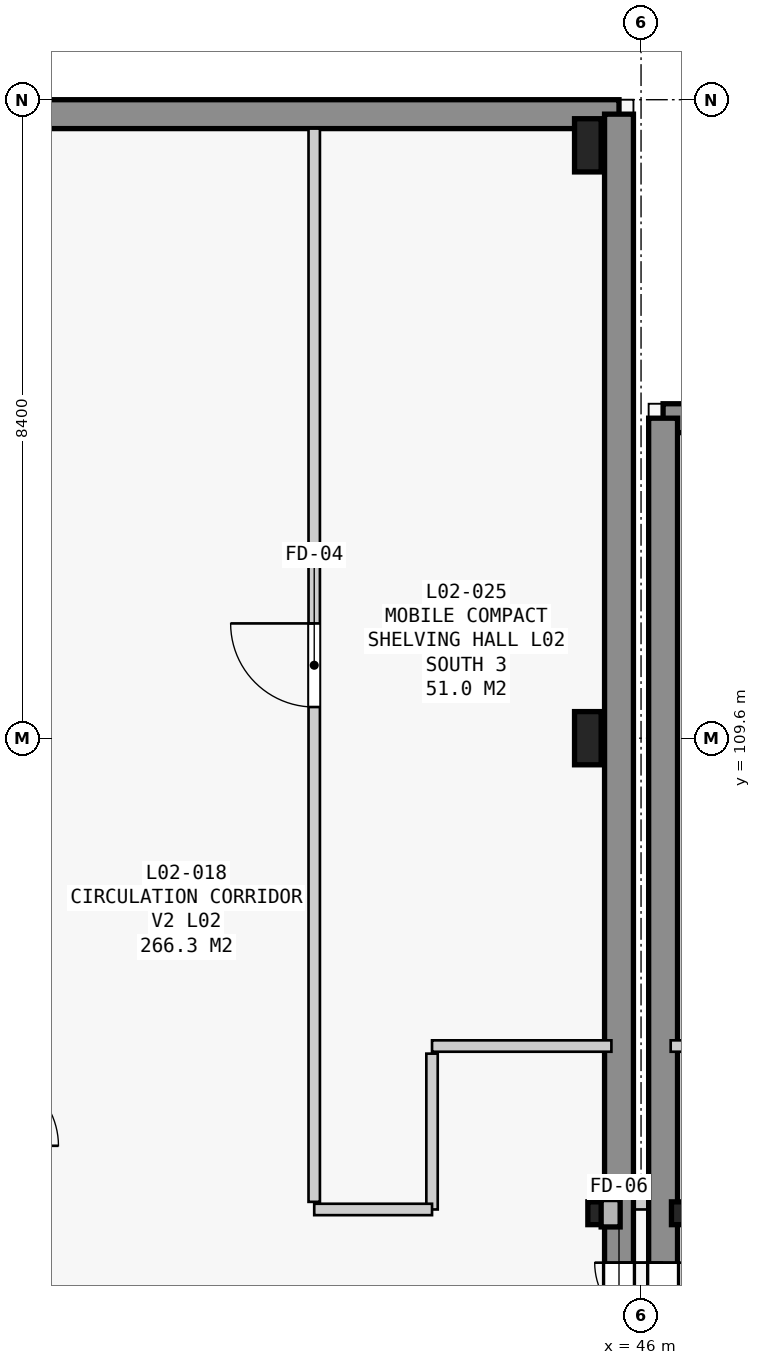
"""IFC4 building model, lengths in metres.
Left out: names, types, materials, properties, quantities, classifications, styles, units other than length and angle.
Written with IfcOpenShell. Run it as: python <this file> out.ifc"""

import sys

from ifc_helpers import new_model, si_unit, direction, frame, frame_2d, origin, origin_2d, place, context, subcontext, project, spatial, rectangle, i_section, extrude, element, fill, save


model = new_model("IFC4")
c1 = context("Model", 3, precision=1e-05, world=origin(), true_north=direction((0.0, 1.0)))
c2 = subcontext(c1, "Body", "Model", "MODEL_VIEW")
j1 = project(units=[si_unit("LENGTHUNIT", "METRE"), si_unit("PLANEANGLEUNIT", "RADIAN")], contexts=[c1])
p1 = place(None, origin())
s1 = spatial("IfcSite", under=j1, at=p1, CompositionType="ELEMENT")
p2 = place(p1, origin())
s2 = spatial("IfcBuilding", under=s1, at=p2, CompositionType="ELEMENT")
p3 = place(p2, frame((0.0, 0.0, 9.6)))
s3 = spatial("IfcBuildingStorey", under=s2, at=p3, CompositionType="ELEMENT", Elevation=9.6)
for number, where, z_axis, x_axis in (
    (1, (45.3, 109.6, 0.0), (0.0, 0.0, 1.0), (1.0, 0.0, 0.0)),
    (2, (45.3, 117.4, 0.0), (0.0, 0.0, 1.0), (1.0, 0.0, 0.0)),
):
    element("IfcColumn", number, at=place(p3, frame(where, z_axis=z_axis, x_axis=x_axis)), inside=s3, PredefinedType="COLUMN", context=c2, shape_type="SweptSolid", body=[
        extrude(rectangle(XDim=0.35, YDim=0.7, at=origin_2d()), origin(), (0.0, 0.0, 1.0), 4.2),
    ])
for number, where, z_axis, x_axis in (
    (3, (45.45, 103.35, 0.0), (0.0, 0.0, 1.0), (1.0, 0.0, 0.0)),
    (4, (46.55, 103.35, 0.0), (0.0, 0.0, 1.0), (1.0, 0.0, 0.0)),
):
    element("IfcColumn", number, at=place(p3, frame(where, z_axis=z_axis, x_axis=x_axis)), inside=s3, PredefinedType="COLUMN", context=c2, shape_type="SweptSolid", body=[
        extrude(i_section(OverallWidth=0.3, OverallDepth=0.3, WebThickness=0.011, FlangeThickness=0.019, FilletRadius=0.027, at=origin_2d()), origin(), (0.0, 0.0, 1.0), 4.2),
    ])
p4 = place(p3, frame((45.9, 103.5, 0.0), z_axis=(0.0, 0.0, 1.0), x_axis=(1.0, 0.0, 0.0)))
e5 = element("IfcWall", 5, at=p4, inside=s3, PredefinedType="STANDARD", context=c2, shape_type="SweptSolid", body=[
    extrude(rectangle(XDim=0.2, YDim=0.2, at=frame_2d((0.1, 0.0))), origin(), (0.0, 0.0, 1.0), 3.94),
])
p5 = place(p3, frame((12.59, 117.81, 0.0), z_axis=(0.0, 0.0, 1.0), x_axis=(1.0, 0.0, 0.0)))
e6 = element("IfcWall", 6, at=p5, inside=s3, PredefinedType="STANDARD", context=c2, shape_type="SweptSolid", body=[
    extrude(rectangle(XDim=33.12, YDim=0.38, at=frame_2d((16.56, 0.0))), origin(), (0.0, 0.0, 1.0), 3.88),
])
p6 = place(p3, frame((45.71, 117.81, 0.0), z_axis=(0.0, 0.0, 1.0), x_axis=(0.0, -1.0, 0.0)))
e7 = element("IfcWall", 7, at=p6, inside=s3, PredefinedType="STANDARD", context=c2, shape_type="SweptSolid", body=[
    extrude(rectangle(XDim=27.22, YDim=0.38, at=frame_2d((13.61, 0.0))), origin(), (0.0, 0.0, 1.0), 3.88),
])
p7 = place(p6, frame((15.11, 0.0, 0.0)))
e8 = element("IfcOpeningElement", 8, at=p7, cuts=e7, PredefinedType="OPENING", context=c2, shape_type="SweptSolid", body=[
    extrude(rectangle(XDim=1.8, YDim=2.2, at=frame_2d((0.9, 1.1))), frame((0.0, 0.2, 0.0), z_axis=(0.0, -1.0, 0.0), x_axis=(1.0, 0.0, 0.0)), (0.0, 0.0, 1.0), 0.4),
])
p8 = place(p3, frame((46.29, 113.81, 0.0), z_axis=(0.0, 0.0, 1.0), x_axis=(1.0, 0.0, 0.0)))
e9 = element("IfcWall", 9, at=p8, inside=s3, PredefinedType="STANDARD", context=c2, shape_type="SweptSolid", body=[
    extrude(rectangle(XDim=78.32, YDim=0.38, at=frame_2d((39.16, 0.0))), origin(), (0.0, 0.0, 1.0), 3.92),
])
p9 = place(p8, frame((23.404, 0.0, 1.05)))
e10 = element("IfcOpeningElement", 10, at=p9, cuts=e9, PredefinedType="OPENING", context=c2, shape_type="SweptSolid", body=[
    extrude(rectangle(XDim=1.65, YDim=2.2, at=frame_2d((0.825, 1.1))), frame((0.0, 0.2, 0.0), z_axis=(0.0, -1.0, 0.0), x_axis=(1.0, 0.0, 0.0)), (0.0, 0.0, 1.0), 0.4),
])
p10 = place(p8, frame((50.791, 0.0, 1.05)))
e11 = element("IfcOpeningElement", 11, at=p10, cuts=e9, PredefinedType="OPENING", context=c2, shape_type="SweptSolid", body=[
    extrude(rectangle(XDim=1.8, YDim=2.5, at=frame_2d((0.9, 1.25))), frame((0.0, 0.2, 0.0), z_axis=(0.0, -1.0, 0.0), x_axis=(1.0, 0.0, 0.0)), (0.0, 0.0, 1.0), 0.4),
])
p11 = place(p3, frame((46.29, 76.29, 0.0), z_axis=(0.0, 0.0, 1.0), x_axis=(0.0, 1.0, 0.0)))
e12 = element("IfcWall", 12, at=p11, inside=s3, PredefinedType="STANDARD", context=c2, shape_type="SweptSolid", body=[
    extrude(rectangle(XDim=37.52, YDim=0.38, at=frame_2d((18.76, 0.0))), origin(), (0.0, 0.0, 1.0), 3.92),
])
p12 = place(p11, frame((24.61, 0.0, 0.0)))
e13 = element("IfcOpeningElement", 13, at=p12, cuts=e12, PredefinedType="OPENING", context=c2, shape_type="SweptSolid", body=[
    extrude(rectangle(XDim=1.8, YDim=2.2, at=frame_2d((0.9, 1.1))), frame((0.0, 0.2, 0.0), z_axis=(0.0, -1.0, 0.0), x_axis=(1.0, 0.0, 0.0)), (0.0, 0.0, 1.0), 0.4),
])
p13 = place(p3, frame((45.61, 105.55, 0.0), z_axis=(0.0, 0.0, 1.0), x_axis=(-1.0, 0.0, 0.0)))
e14 = element("IfcWall", 14, at=p13, inside=s3, PredefinedType="PARTITIONING", context=c2, shape_type="SweptSolid", body=[
    extrude(rectangle(XDim=2.36, YDim=0.15, at=frame_2d((1.18, 0.0))), origin(), (0.0, 0.0, 1.0), 3.06),
])
p14 = place(p3, frame((43.25, 105.45, 0.0), z_axis=(0.0, 0.0, 1.0), x_axis=(0.0, -1.0, 0.0)))
e15 = element("IfcWall", 15, at=p14, inside=s3, PredefinedType="PARTITIONING", context=c2, shape_type="SweptSolid", body=[
    extrude(rectangle(XDim=2.05, YDim=0.15, at=frame_2d((1.025, 0.0))), origin(), (0.0, 0.0, 1.0), 3.88),
])
p15 = place(p3, frame((43.25, 103.4, 0.0), z_axis=(0.0, 0.0, 1.0), x_axis=(-1.0, 0.0, 0.0)))
e16 = element("IfcWall", 16, at=p15, inside=s3, PredefinedType="PARTITIONING", context=c2, shape_type="SweptSolid", body=[
    extrude(rectangle(XDim=1.55, YDim=0.15, at=frame_2d((0.775, 0.0))), origin(), (0.0, 0.0, 1.0), 3.88),
])
p16 = place(p3, frame((41.7, 103.5, 0.0), z_axis=(0.0, 0.0, 1.0), x_axis=(0.0, 1.0, 0.0)))
e17 = element("IfcWall", 17, at=p16, inside=s3, PredefinedType="PARTITIONING", context=c2, shape_type="SweptSolid", body=[
    extrude(rectangle(XDim=14.12, YDim=0.15, at=frame_2d((7.06, 0.0))), origin(), (0.0, 0.0, 1.0), 3.01),
])
p17 = place(p16, frame((6.51, 0.0, 0.0)))
e18 = element("IfcOpeningElement", 18, at=p17, cuts=e17, PredefinedType="OPENING", context=c2, shape_type="SweptSolid", body=[
    extrude(rectangle(XDim=1.1, YDim=2.15, at=frame_2d((0.55, 1.075))), frame((0.0, 0.085, 0.0), z_axis=(0.0, -1.0, 0.0), x_axis=(1.0, 0.0, 0.0)), (0.0, 0.0, 1.0), 0.17),
])
p18 = place(p3, frame((48.65, 105.55, 0.0), z_axis=(0.0, 0.0, 1.0), x_axis=(-1.0, 0.0, 0.0)))
e19 = element("IfcWall", 19, at=p18, inside=s3, PredefinedType="PARTITIONING", context=c2, shape_type="SweptSolid", body=[
    extrude(rectangle(XDim=2.26, YDim=0.15, at=frame_2d((1.13, 0.0))), origin(), (0.0, 0.0, 1.0), 2.715),
])
p19 = place(p7, origin())
e20 = element("IfcDoor", 20, at=p19, inside=s3, OperationType="DOUBLE_DOOR_SINGLE_SWING", PredefinedType="DOOR", context=c2, shape_type="SweptSolid", body=[
    extrude(rectangle(XDim=1.8, YDim=2.2, at=frame_2d((0.9, 1.1))), frame((0.0, 0.025, 0.0), z_axis=(0.0, -1.0, 0.0), x_axis=(1.0, 0.0, 0.0)), (0.0, 0.0, 1.0), 0.05),
])
fill(e8, e20)
p20 = place(p12, origin())
e21 = element("IfcDoor", 21, at=p20, inside=s3, OperationType="DOUBLE_DOOR_SINGLE_SWING", PredefinedType="DOOR", context=c2, shape_type="SweptSolid", body=[
    extrude(rectangle(XDim=1.8, YDim=2.2, at=frame_2d((0.9, 1.1))), frame((0.0, 0.025, 0.0), z_axis=(0.0, -1.0, 0.0), x_axis=(1.0, 0.0, 0.0)), (0.0, 0.0, 1.0), 0.05),
])
fill(e13, e21)
p21 = place(p17, origin())
e22 = element("IfcDoor", 22, at=p21, inside=s3, OperationType="SINGLE_SWING_RIGHT", PredefinedType="DOOR", context=c2, shape_type="SweptSolid", body=[
    extrude(rectangle(XDim=1.1, YDim=2.15, at=frame_2d((0.55, 1.075))), frame((0.0, 0.025, 0.0), z_axis=(0.0, -1.0, 0.0), x_axis=(1.0, 0.0, 0.0)), (0.0, 0.0, 1.0), 0.05),
])
fill(e18, e22)
save(model, sys.argv[1])
